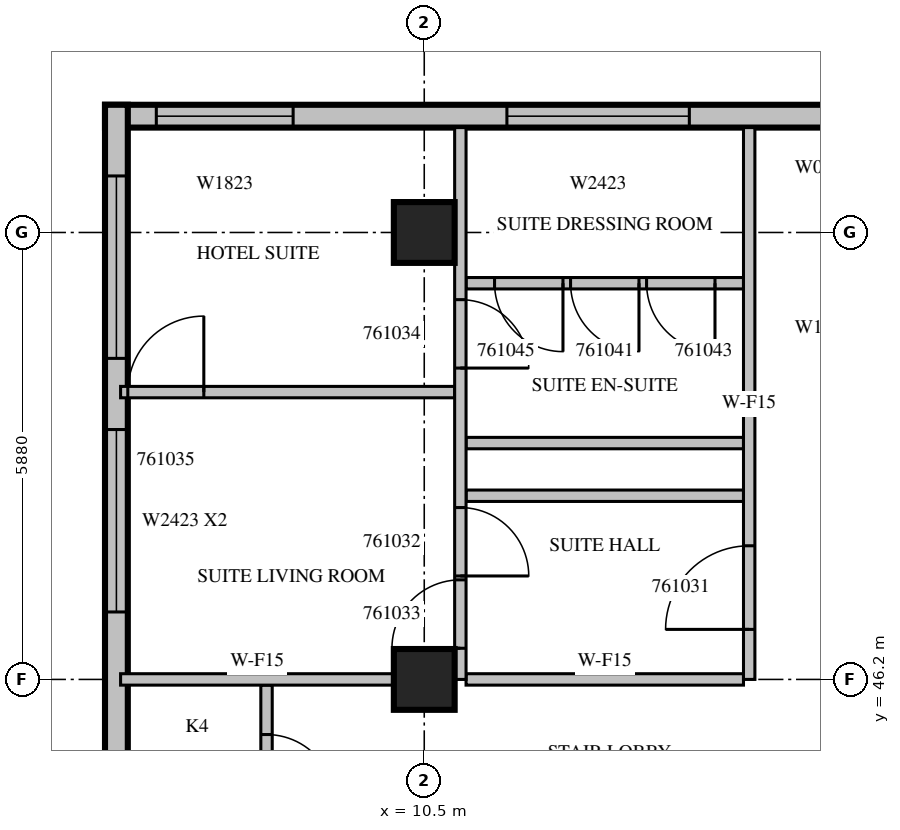
"""IFC4 building model, lengths in metres.
Left out: names, types, materials, properties, quantities, classifications, styles, units other than length and angle.
Written with IfcOpenShell. Run it as: python <this file> out.ifc"""

import sys

from ifc_helpers import new_model, si_unit, direction, frame, frame_2d, origin, origin_2d, place, context, subcontext, project, spatial, rectangle, extrude, source, transform, mapped, element, fill, save


model = new_model("IFC4")
c1 = context("Model", 3, precision=1e-05, world=origin(), true_north=direction((0.0, 1.0)))
c2 = subcontext(c1, "Body", "Model", "MODEL_VIEW")
j1 = project(units=[si_unit("LENGTHUNIT", "METRE"), si_unit("PLANEANGLEUNIT", "RADIAN")], contexts=[c1])
p1 = place(None, origin())
s1 = spatial("IfcSite", under=j1, at=p1, CompositionType="ELEMENT")
p2 = place(p1, origin())
s2 = spatial("IfcBuilding", under=s1, at=p2, CompositionType="ELEMENT")
p3 = place(p2, frame((0.0, 0.0, 265.2)))
s3 = spatial("IfcBuildingStorey", under=s2, at=p3, CompositionType="ELEMENT", Elevation=265.2)
m1 = source(origin(), c2, "Body", "SweptSolid", [
    extrude(rectangle(XDim=0.8, YDim=0.8, at=origin_2d()), origin(), (0.0, 0.0, 1.0), 3.8),
])
for number, where, z_axis, x_axis in (
    (1, (10.5, 46.2, 0.0), (0.0, 0.0, 1.0), (1.0, 0.0, 0.0)),
    (2, (10.5, 52.08, 0.0), (0.0, 0.0, 1.0), (1.0, 0.0, 0.0)),
):
    element("IfcColumn", number, at=place(p3, frame(where, z_axis=z_axis, x_axis=x_axis)), inside=s3, PredefinedType="COLUMN", context=c2, shape_type="MappedRepresentation", body=[
        mapped(m1, transform((0.0, 0.0, 0.0), scale=1.0)),
    ])
m2 = source(origin(), c2, "Body", "SweptSolid", [
    extrude(rectangle(XDim=10.5, YDim=0.3, at=frame_2d((5.25, 0.0))), origin(), (0.0, 0.0, 1.0), 3.4),
])
p4 = place(p3, frame((16.8, 53.61, 0.0), z_axis=(0.0, 0.0, 1.0), x_axis=(-1.0, 0.0, 0.0)))
e3 = element("IfcWall", 3, at=p4, inside=s3, PredefinedType="STANDARD", context=c2, shape_type="MappedRepresentation", body=[
    mapped(m2, transform((0.0, 0.0, 0.0), scale=1.0)),
])
m3 = source(origin(), c2, "Body", "SweptSolid", [
    extrude(rectangle(XDim=1.8, YDim=2.3, at=frame_2d((0.9, 1.15))), frame((0.0, 0.16, 0.0), z_axis=(0.0, -1.0, 0.0), x_axis=(1.0, 0.0, 0.0)), (0.0, 0.0, 1.0), 0.32),
])
p5 = place(p4, frame((8.025, 0.0, 0.6)))
e4 = element("IfcOpeningElement", 4, at=p5, cuts=e3, PredefinedType="OPENING", context=c2, shape_type="MappedRepresentation", body=[
    mapped(m3, transform((0.0, 0.0, 0.0), scale=1.0)),
])
m4 = source(origin(), c2, "Body", "SweptSolid", [
    extrude(rectangle(XDim=2.4, YDim=2.3, at=frame_2d((1.2, 1.15))), frame((0.0, 0.16, 0.0), z_axis=(0.0, -1.0, 0.0), x_axis=(1.0, 0.0, 0.0)), (0.0, 0.0, 1.0), 0.32),
])
p6 = place(p4, frame((2.812, 0.0, 0.6)))
e5 = element("IfcOpeningElement", 5, at=p6, cuts=e3, PredefinedType="OPENING", context=c2, shape_type="MappedRepresentation", body=[
    mapped(m4, transform((0.0, 0.0, 0.0), scale=1.0)),
])
m5 = source(origin(), c2, "Body", "SweptSolid", [
    extrude(rectangle(XDim=9.91, YDim=0.3, at=frame_2d((4.955, 0.0))), origin(), (0.0, 0.0, 1.0), 3.4),
])
p7 = place(p3, frame((6.45, 53.76, 0.0), z_axis=(0.0, 0.0, 1.0), x_axis=(0.0, -1.0, 0.0)))
e6 = element("IfcWall", 6, at=p7, inside=s3, PredefinedType="STANDARD", context=c2, shape_type="MappedRepresentation", body=[
    mapped(m5, transform((0.0, 0.0, 0.0), scale=1.0)),
])
p8 = place(p7, frame((4.272, 0.0, 0.6)))
e7 = element("IfcOpeningElement", 7, at=p8, cuts=e6, PredefinedType="OPENING", context=c2, shape_type="MappedRepresentation", body=[
    mapped(m4, transform((0.0, 0.0, 0.0), scale=1.0)),
])
p9 = place(p7, frame((0.936, 0.0, 0.6)))
e8 = element("IfcOpeningElement", 8, at=p9, cuts=e6, PredefinedType="OPENING", context=c2, shape_type="MappedRepresentation", body=[
    mapped(m4, transform((0.0, 0.0, 0.0), scale=1.0)),
])
m6 = source(origin(), c2, "Body", "SweptSolid", [
    extrude(rectangle(XDim=2.2, YDim=0.15, at=frame_2d((1.1, 0.0))), origin(), (0.0, 0.0, 1.0), 3.4),
])
p10 = place(p3, frame((8.425, 43.925, 0.0), z_axis=(0.0, 0.0, 1.0), x_axis=(0.0, 1.0, 0.0)))
e9 = element("IfcWall", 9, at=p10, inside=s3, PredefinedType="PARTITIONING", context=c2, shape_type="MappedRepresentation", body=[
    mapped(m6, transform((0.0, 0.0, 0.0), scale=1.0)),
])
m7 = source(origin(), c2, "Body", "SweptSolid", [
    extrude(rectangle(XDim=0.9, YDim=2.1, at=frame_2d((0.45, 1.05))), frame((0.0, 0.085, 0.0), z_axis=(0.0, -1.0, 0.0), x_axis=(1.0, 0.0, 0.0)), (0.0, 0.0, 1.0), 0.17),
])
p11 = place(p10, frame((0.65, 0.0, 0.0)))
e10 = element("IfcOpeningElement", 10, at=p11, cuts=e9, PredefinedType="OPENING", context=c2, shape_type="MappedRepresentation", body=[
    mapped(m7, transform((0.0, 0.0, 0.0), scale=1.0)),
])
m8 = source(origin(), c2, "Body", "SweptSolid", [
    extrude(rectangle(XDim=4.395, YDim=0.15, at=frame_2d((2.197, 0.0))), origin(), (0.0, 0.0, 1.0), 3.4),
])
p12 = place(p3, frame((10.9, 49.98, 0.0), z_axis=(0.0, 0.0, 1.0), x_axis=(-1.0, 0.0, 0.0)))
e11 = element("IfcWall", 11, at=p12, inside=s3, PredefinedType="PARTITIONING", context=c2, shape_type="MappedRepresentation", body=[
    mapped(m8, transform((0.0, 0.0, 0.0), scale=1.0)),
])
m9 = source(origin(), c2, "Body", "SweptSolid", [
    extrude(rectangle(XDim=1.0, YDim=2.1, at=frame_2d((0.5, 1.05))), frame((0.0, 0.085, 0.0), z_axis=(0.0, -1.0, 0.0), x_axis=(1.0, 0.0, 0.0)), (0.0, 0.0, 1.0), 0.17),
])
p13 = place(p12, frame((3.3, 0.0, 0.0)))
e12 = element("IfcOpeningElement", 12, at=p13, cuts=e11, PredefinedType="OPENING", context=c2, shape_type="MappedRepresentation", body=[
    mapped(m9, transform((0.0, 0.0, 0.0), scale=1.0)),
])
m10 = source(origin(), c2, "Body", "SweptSolid", [
    extrude(rectangle(XDim=3.65, YDim=0.15, at=frame_2d((1.825, 0.0))), origin(), (0.0, 0.0, 1.0), 3.4),
])
for number, where, z_axis, x_axis in (
    (13, (14.7, 48.617, 0.0), (0.0, 0.0, 1.0), (-1.0, 0.0, 0.0)),
    (14, (14.7, 49.309, 0.0), (0.0, 0.0, 1.0), (-1.0, 0.0, 0.0)),
):
    element("IfcWall", number, at=place(p3, frame(where, z_axis=z_axis, x_axis=x_axis)), inside=s3, PredefinedType="PARTITIONING", context=c2, shape_type="MappedRepresentation", body=[
        mapped(m10, transform((0.0, 0.0, 0.0), scale=1.0)),
    ])
p14 = place(p3, frame((14.7, 51.412, 0.0), z_axis=(0.0, 0.0, 1.0), x_axis=(-1.0, 0.0, 0.0)))
e15 = element("IfcWall", 15, at=p14, inside=s3, PredefinedType="PARTITIONING", context=c2, shape_type="MappedRepresentation", body=[
    mapped(m10, transform((0.0, 0.0, 0.0), scale=1.0)),
])
p15 = place(p14, frame((1.375, 0.0, 0.0)))
e16 = element("IfcOpeningElement", 16, at=p15, cuts=e15, PredefinedType="OPENING", context=c2, shape_type="MappedRepresentation", body=[
    mapped(m7, transform((0.0, 0.0, 0.0), scale=1.0)),
])
p16 = place(p14, frame((0.375, 0.0, 0.0)))
e17 = element("IfcOpeningElement", 17, at=p16, cuts=e15, PredefinedType="OPENING", context=c2, shape_type="MappedRepresentation", body=[
    mapped(m7, transform((0.0, 0.0, 0.0), scale=1.0)),
])
p17 = place(p14, frame((2.375, 0.0, 0.0)))
e18 = element("IfcOpeningElement", 18, at=p17, cuts=e15, PredefinedType="OPENING", context=c2, shape_type="MappedRepresentation", body=[
    mapped(m7, transform((0.0, 0.0, 0.0), scale=1.0)),
])
m11 = source(origin(), c2, "Body", "SweptSolid", [
    extrude(rectangle(XDim=3.596, YDim=0.15, at=frame_2d((1.798, 0.0))), origin(), (0.0, 0.0, 1.0), 3.4),
])
p18 = place(p3, frame((10.101, 46.2, 0.0), z_axis=(0.0, 0.0, 1.0), x_axis=(-1.0, 0.0, 0.0)))
e19 = element("IfcWall", 19, at=p18, inside=s3, PredefinedType="PARTITIONING", context=c2, shape_type="MappedRepresentation", body=[
    mapped(m11, transform((0.0, 0.0, 0.0), scale=1.0)),
])
p19 = place(p3, frame((14.7, 46.2, 0.0), z_axis=(0.0, 0.0, 1.0), x_axis=(-1.0, 0.0, 0.0)))
e20 = element("IfcWall", 20, at=p19, inside=s3, PredefinedType="PARTITIONING", context=c2, shape_type="MappedRepresentation", body=[
    mapped(m10, transform((0.0, 0.0, 0.0), scale=1.0)),
])
m12 = source(origin(), c2, "Body", "SweptSolid", [
    extrude(rectangle(XDim=7.26, YDim=0.15, at=frame_2d((3.63, 0.0))), origin(), (0.0, 0.0, 1.0), 3.4),
])
p20 = place(p3, frame((10.975, 46.2, 0.0), z_axis=(0.0, 0.0, 1.0), x_axis=(0.0, 1.0, 0.0)))
e21 = element("IfcWall", 21, at=p20, inside=s3, PredefinedType="PARTITIONING", context=c2, shape_type="MappedRepresentation", body=[
    mapped(m12, transform((0.0, 0.0, 0.0), scale=1.0)),
])
p21 = place(p20, frame((1.361, 0.0, 0.0)))
e22 = element("IfcOpeningElement", 22, at=p21, cuts=e21, PredefinedType="OPENING", context=c2, shape_type="MappedRepresentation", body=[
    mapped(m7, transform((0.0, 0.0, 0.0), scale=1.0)),
])
p22 = place(p20, frame((0.41, 0.0, 0.0)))
e23 = element("IfcOpeningElement", 23, at=p22, cuts=e21, PredefinedType="OPENING", context=c2, shape_type="MappedRepresentation", body=[
    mapped(m7, transform((0.0, 0.0, 0.0), scale=1.0)),
])
p23 = place(p20, frame((4.096, 0.0, 0.0)))
e24 = element("IfcOpeningElement", 24, at=p23, cuts=e21, PredefinedType="OPENING", context=c2, shape_type="MappedRepresentation", body=[
    mapped(m7, transform((0.0, 0.0, 0.0), scale=1.0)),
])
p24 = place(p3, frame((14.775, 46.2, 0.0), z_axis=(0.0, 0.0, 1.0), x_axis=(0.0, 1.0, 0.0)))
e25 = element("IfcWall", 25, at=p24, inside=s3, PredefinedType="PARTITIONING", context=c2, shape_type="MappedRepresentation", body=[
    mapped(m12, transform((0.0, 0.0, 0.0), scale=1.0)),
])
m13 = source(origin(), c2, "Body", "SweptSolid", [
    extrude(rectangle(XDim=1.1, YDim=2.1, at=frame_2d((0.55, 1.05))), frame((0.0, 0.085, 0.0), z_axis=(0.0, -1.0, 0.0), x_axis=(1.0, 0.0, 0.0)), (0.0, 0.0, 1.0), 0.17),
])
p25 = place(p24, frame((0.658, 0.0, 0.0)))
e26 = element("IfcOpeningElement", 26, at=p25, cuts=e25, PredefinedType="OPENING", context=c2, shape_type="MappedRepresentation", body=[
    mapped(m13, transform((0.0, 0.0, 0.0), scale=1.0)),
])
m14 = source(origin(), c2, "Body", "SweptSolid", [
    extrude(rectangle(XDim=1.8, YDim=2.3, at=frame_2d((0.9, 1.15))), frame((0.0, 0.03, 0.0), z_axis=(0.0, -1.0, 0.0), x_axis=(1.0, 0.0, 0.0)), (0.0, 0.0, 1.0), 0.06),
])
p26 = place(p5, origin())
e27 = element("IfcWindow", 27, at=p26, inside=s3, PartitioningType="SINGLE_PANEL", PredefinedType="WINDOW", context=c2, shape_type="MappedRepresentation", body=[
    mapped(m14, transform((0.0, 0.0, 0.0), scale=1.0)),
])
fill(e4, e27)
m15 = source(origin(), c2, "Body", "SweptSolid", [
    extrude(rectangle(XDim=2.4, YDim=2.3, at=frame_2d((1.2, 1.15))), frame((0.0, 0.03, 0.0), z_axis=(0.0, -1.0, 0.0), x_axis=(1.0, 0.0, 0.0)), (0.0, 0.0, 1.0), 0.06),
])
p27 = place(p6, origin())
e28 = element("IfcWindow", 28, at=p27, inside=s3, PartitioningType="SINGLE_PANEL", PredefinedType="WINDOW", context=c2, shape_type="MappedRepresentation", body=[
    mapped(m15, transform((0.0, 0.0, 0.0), scale=1.0)),
])
fill(e5, e28)
p28 = place(p8, origin())
e29 = element("IfcWindow", 29, at=p28, inside=s3, PartitioningType="SINGLE_PANEL", PredefinedType="WINDOW", context=c2, shape_type="MappedRepresentation", body=[
    mapped(m15, transform((0.0, 0.0, 0.0), scale=1.0)),
])
fill(e7, e29)
p29 = place(p9, origin())
e30 = element("IfcWindow", 30, at=p29, inside=s3, PartitioningType="SINGLE_PANEL", PredefinedType="WINDOW", context=c2, shape_type="MappedRepresentation", body=[
    mapped(m15, transform((0.0, 0.0, 0.0), scale=1.0)),
])
fill(e8, e30)
m16 = source(origin(), c2, "Body", "SweptSolid", [
    extrude(rectangle(XDim=0.9, YDim=2.1, at=frame_2d((0.45, 1.05))), frame((0.0, 0.025, 0.0), z_axis=(0.0, -1.0, 0.0), x_axis=(1.0, 0.0, 0.0)), (0.0, 0.0, 1.0), 0.05),
])
p30 = place(p11, origin())
e31 = element("IfcDoor", 31, at=p30, inside=s3, OperationType="SINGLE_SWING_RIGHT", PredefinedType="DOOR", context=c2, shape_type="MappedRepresentation", body=[
    mapped(m16, transform((0.0, 0.0, 0.0), scale=1.0)),
])
fill(e10, e31)
m17 = source(origin(), c2, "Body", "SweptSolid", [
    extrude(rectangle(XDim=1.1, YDim=2.1, at=frame_2d((0.55, 1.05))), frame((0.0, 0.025, 0.0), z_axis=(0.0, -1.0, 0.0), x_axis=(1.0, 0.0, 0.0)), (0.0, 0.0, 1.0), 0.05),
])
p31 = place(p25, origin())
e32 = element("IfcDoor", 32, at=p31, inside=s3, OperationType="SINGLE_SWING_LEFT", PredefinedType="DOOR", context=c2, shape_type="MappedRepresentation", body=[
    mapped(m17, transform((0.0, 0.0, 0.0), scale=1.0)),
])
fill(e26, e32)
p32 = place(p21, origin())
e33 = element("IfcDoor", 33, at=p32, inside=s3, OperationType="SINGLE_SWING_RIGHT", PredefinedType="DOOR", context=c2, shape_type="MappedRepresentation", body=[
    mapped(m16, transform((0.0, 0.0, 0.0), scale=1.0)),
])
fill(e22, e33)
p33 = place(p22, origin())
e34 = element("IfcDoor", 34, at=p33, inside=s3, OperationType="SINGLE_SWING_LEFT", PredefinedType="DOOR", context=c2, shape_type="MappedRepresentation", body=[
    mapped(m16, transform((0.0, 0.0, 0.0), scale=1.0)),
])
fill(e23, e34)
p34 = place(p23, origin())
e35 = element("IfcDoor", 35, at=p34, inside=s3, OperationType="SINGLE_SWING_RIGHT", PredefinedType="DOOR", context=c2, shape_type="MappedRepresentation", body=[
    mapped(m16, transform((0.0, 0.0, 0.0), scale=1.0)),
])
fill(e24, e35)
m18 = source(origin(), c2, "Body", "SweptSolid", [
    extrude(rectangle(XDim=1.0, YDim=2.1, at=frame_2d((0.5, 1.05))), frame((0.0, 0.025, 0.0), z_axis=(0.0, -1.0, 0.0), x_axis=(1.0, 0.0, 0.0)), (0.0, 0.0, 1.0), 0.05),
])
p35 = place(p13, origin())
e36 = element("IfcDoor", 36, at=p35, inside=s3, OperationType="SINGLE_SWING_RIGHT", PredefinedType="DOOR", context=c2, shape_type="MappedRepresentation", body=[
    mapped(m18, transform((0.0, 0.0, 0.0), scale=1.0)),
])
fill(e12, e36)
p36 = place(p15, origin())
e37 = element("IfcDoor", 37, at=p36, inside=s3, OperationType="SINGLE_SWING_LEFT", PredefinedType="DOOR", context=c2, shape_type="MappedRepresentation", body=[
    mapped(m16, transform((0.0, 0.0, 0.0), scale=1.0)),
])
fill(e16, e37)
p37 = place(p16, origin())
e38 = element("IfcDoor", 38, at=p37, inside=s3, OperationType="SINGLE_SWING_LEFT", PredefinedType="DOOR", context=c2, shape_type="MappedRepresentation", body=[
    mapped(m16, transform((0.0, 0.0, 0.0), scale=1.0)),
])
fill(e17, e38)
p38 = place(p17, origin())
e39 = element("IfcDoor", 39, at=p38, inside=s3, OperationType="SINGLE_SWING_LEFT", PredefinedType="DOOR", context=c2, shape_type="MappedRepresentation", body=[
    mapped(m16, transform((0.0, 0.0, 0.0), scale=1.0)),
])
fill(e18, e39)
save(model, sys.argv[1])
